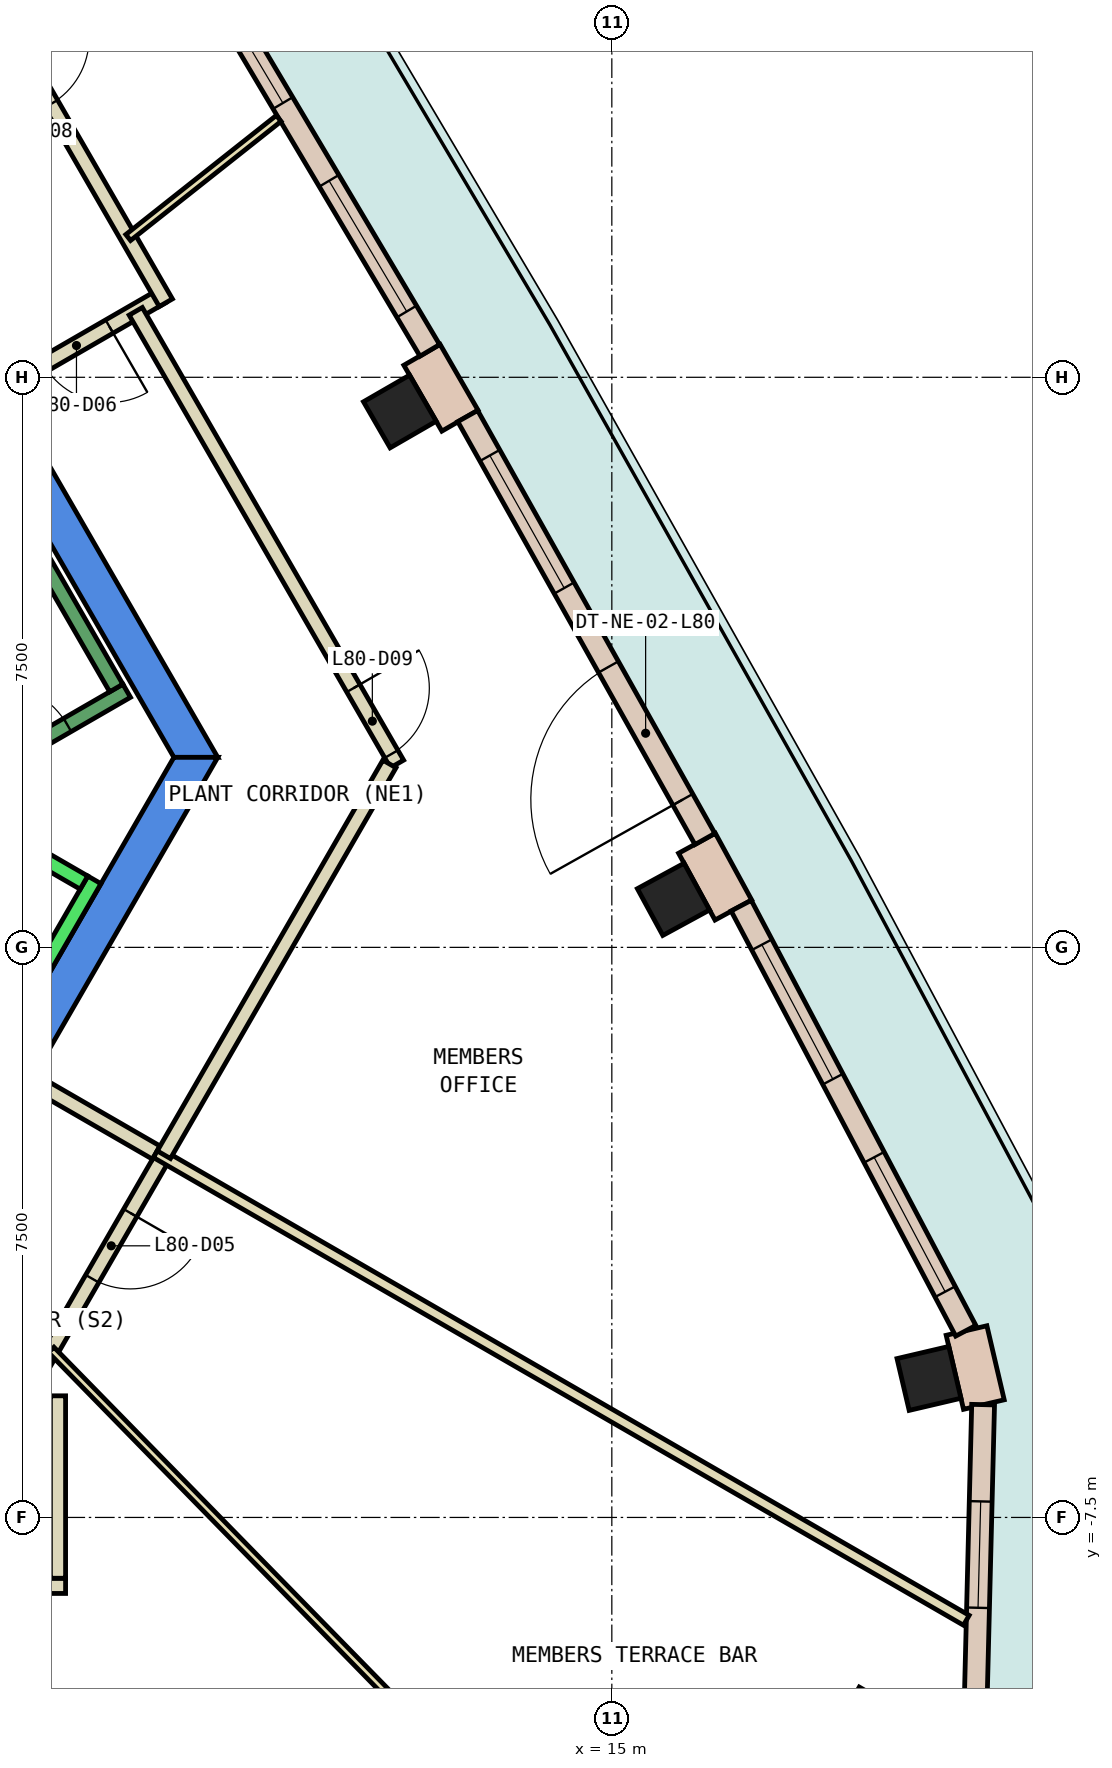
"""IFC4 building model, lengths in metres.
Left out: names, types, materials, properties, quantities, classifications, styles, units other than length and angle.
Written with IfcOpenShell. Run it as: python <this file> out.ifc"""

import sys

from ifc_helpers import new_model, si_unit, direction, frame, frame_2d, origin, origin_2d, place, context, subcontext, project, spatial, polyline, rectangle, outline, extrude, element, fill, save


model = new_model("IFC4")
c1 = context("Model", 3, precision=1e-05, world=origin(), true_north=direction((0.0, 1.0)))
c2 = subcontext(c1, "Body", "Model", "MODEL_VIEW")
j1 = project(units=[si_unit("LENGTHUNIT", "METRE"), si_unit("PLANEANGLEUNIT", "RADIAN")], contexts=[c1])
p1 = place(None, origin())
s1 = spatial("IfcSite", under=j1, at=p1, CompositionType="ELEMENT")
p2 = place(p1, origin())
s2 = spatial("IfcBuilding", under=s1, at=p2, CompositionType="ELEMENT")
p3 = place(p2, frame((0.0, 0.0, 340.4)))
s3 = spatial("IfcBuildingStorey", under=s2, at=p3, CompositionType="ELEMENT", Elevation=340.4)
p4 = place(p3, frame((18.512, -10.688, 0.0), z_axis=(0.0, 0.0, 1.0), x_axis=(-0.866025403784, 0.5, 0.0)))
e1 = element("IfcColumn", 1, at=p4, inside=s3, PredefinedType="COLUMN", context=c2, shape_type="SweptSolid", body=[
    extrude(rectangle(XDim=1.4, YDim=1.4, at=origin_2d()), origin(), (0.0, 0.0, 1.0), 4.15),
])
for number, where, z_axis, x_axis in (
    (2, (19.173, -5.671, 0.0), (0.0, 0.0, 1.0), (-0.228, 0.974, 0.0)),
    (3, (15.811, 0.632, 0.0), (0.0, 0.0, 1.0), (-0.478, 0.878, 0.0)),
    (4, (12.211, 7.05, 0.0), (0.0, 0.0, 1.0), (-0.5, 0.866, 0.0)),
):
    element("IfcColumn", number, at=place(p3, frame(where, z_axis=z_axis, x_axis=x_axis)), inside=s3, PredefinedType="COLUMN", context=c2, shape_type="SweptSolid", body=[
        extrude(rectangle(XDim=0.7, YDim=0.7, at=origin_2d()), origin(), (0.0, 0.0, 1.0), 4.15),
    ])
p5 = place(p3, frame((0.0, 0.0, -0.45)))
e5 = element("IfcWall", 5, at=p5, inside=s3, PredefinedType="SHEAR", context=c2, shape_type="SweptSolid", body=[
    extrude(outline(polyline([(5.486, 9.998), (5.053, 9.748), (9.238, 2.5), (9.815, 2.5), (5.486, 9.998)])), origin(), (0.0, 0.0, 1.0), 4.6),
])
p6 = place(p3, frame((0.0, 0.0, -0.45)))
e6 = element("IfcWall", 6, at=p6, inside=s3, PredefinedType="SHEAR", context=c2, shape_type="SweptSolid", body=[
    extrude(outline(polyline([(4.907, -6.0), (9.815, 2.5), (9.238, 2.5), (4.619, -5.5), (4.907, -6.0)])), origin(), (0.0, 0.0, 1.0), 4.6),
])
p7 = place(p3, frame((19.895, -6.015, 0.0), z_axis=(0.0, 0.0, 1.0), x_axis=(-0.227978015861, 0.97366627973, 0.0)))
e7 = element("IfcWall", 7, at=p7, inside=s3, PredefinedType="STANDARD", context=c2, shape_type="SweptSolid", body=[
    extrude(rectangle(XDim=1.0, YDim=0.55, at=frame_2d((0.5, 0.0))), origin(), (0.0, 0.0, 1.0), 4.15),
])
p8 = place(p3, frame((16.599, 0.491, 0.0), z_axis=(0.0, 0.0, 1.0), x_axis=(-0.478442030542, 0.878119139645, 0.0)))
e8 = element("IfcWall", 8, at=p8, inside=s3, PredefinedType="STANDARD", context=c2, shape_type="SweptSolid", body=[
    extrude(rectangle(XDim=1.001, YDim=0.55, at=frame_2d((0.5, 0.0))), origin(), (0.0, 0.0, 1.0), 4.15),
])
p9 = place(p3, frame((13.002, 6.929, 0.0), z_axis=(0.0, 0.0, 1.0), x_axis=(-0.49960277677, 0.866254619292, 0.0)))
e9 = element("IfcWall", 9, at=p9, inside=s3, PredefinedType="STANDARD", context=c2, shape_type="SweptSolid", body=[
    extrude(rectangle(XDim=1.001, YDim=0.55, at=frame_2d((0.5, 0.0))), origin(), (0.0, 0.0, 1.0), 4.15),
])
p10 = place(p3, frame((19.776, -10.379, 0.0), z_axis=(0.0, 0.0, 1.0), x_axis=(0.025006167975, 0.99968729689, 0.0)))
e10 = element("IfcWall", 10, at=p10, inside=s3, PredefinedType="STANDARD", context=c2, shape_type="SweptSolid", body=[
    extrude(rectangle(XDim=4.364, YDim=0.3, at=frame_2d((2.182, 0.0))), origin(), (0.0, 0.0, 1.0), 4.15),
])
p11 = place(p10, frame((1.691, 0.0, 0.9)))
e11 = element("IfcOpeningElement", 11, at=p11, cuts=e10, PredefinedType="OPENING", context=c2, shape_type="SweptSolid", body=[
    extrude(rectangle(XDim=1.4, YDim=3.0, at=frame_2d((0.7, 1.5))), frame((0.0, 0.16, 0.0), z_axis=(0.0, -1.0, 0.0), x_axis=(1.0, 0.0, 0.0)), (0.0, 0.0, 1.0), 0.32),
])
p12 = place(p3, frame((19.657, -5.044, 0.0), z_axis=(0.0, 0.0, 1.0), x_axis=(-0.467155191513, 0.884175337274, 0.0)))
e12 = element("IfcWall", 12, at=p12, inside=s3, PredefinedType="STANDARD", context=c2, shape_type="SweptSolid", body=[
    extrude(rectangle(XDim=6.326, YDim=0.3, at=frame_2d((3.163, 0.0))), origin(), (0.0, 0.0, 1.0), 4.15),
])
p13 = place(p12, frame((0.581, 0.0, 0.9)))
e13 = element("IfcOpeningElement", 13, at=p13, cuts=e12, PredefinedType="OPENING", context=c2, shape_type="SweptSolid", body=[
    extrude(rectangle(XDim=2.0, YDim=3.0, at=frame_2d((1.0, 1.5))), frame((0.0, 0.16, 0.0), z_axis=(0.0, -1.0, 0.0), x_axis=(1.0, 0.0, 0.0)), (0.0, 0.0, 1.0), 0.32),
])
p14 = place(p12, frame((3.744, 0.0, 0.9)))
e14 = element("IfcOpeningElement", 14, at=p14, cuts=e12, PredefinedType="OPENING", context=c2, shape_type="SweptSolid", body=[
    extrude(rectangle(XDim=2.0, YDim=3.0, at=frame_2d((1.0, 1.5))), frame((0.0, 0.16, 0.0), z_axis=(0.0, -1.0, 0.0), x_axis=(1.0, 0.0, 0.0)), (0.0, 0.0, 1.0), 0.32),
])
p15 = place(p3, frame((16.225, 1.426, 0.0), z_axis=(0.0, 0.0, 1.0), x_axis=(-0.489232514948, 0.872153396094, 0.0)))
e15 = element("IfcWall", 15, at=p15, inside=s3, PredefinedType="STANDARD", context=c2, shape_type="SweptSolid", body=[
    extrude(rectangle(XDim=6.38, YDim=0.3, at=frame_2d((3.19, 0.0))), origin(), (0.0, 0.0, 1.0), 4.15),
])
p16 = place(p15, frame((0.595, 0.0, 0.0)))
e16 = element("IfcOpeningElement", 16, at=p16, cuts=e15, PredefinedType="OPENING", context=c2, shape_type="SweptSolid", body=[
    extrude(rectangle(XDim=2.0, YDim=2.4, at=frame_2d((1.0, 1.2))), frame((0.0, 0.16, 0.0), z_axis=(0.0, -1.0, 0.0), x_axis=(1.0, 0.0, 0.0)), (0.0, 0.0, 1.0), 0.32),
])
p17 = place(p15, frame((3.785, 0.0, 0.9)))
e17 = element("IfcOpeningElement", 17, at=p17, cuts=e15, PredefinedType="OPENING", context=c2, shape_type="SweptSolid", body=[
    extrude(rectangle(XDim=2.0, YDim=3.0, at=frame_2d((1.0, 1.5))), frame((0.0, 0.16, 0.0), z_axis=(0.0, -1.0, 0.0), x_axis=(1.0, 0.0, 0.0)), (0.0, 0.0, 1.0), 0.32),
])
p18 = place(p3, frame((12.605, 7.854, 0.0), z_axis=(0.0, 0.0, 1.0), x_axis=(-0.510686403068, 0.859767060152, 0.0)))
e18 = element("IfcWall", 18, at=p18, inside=s3, PredefinedType="STANDARD", context=c2, shape_type="SweptSolid", body=[
    extrude(rectangle(XDim=6.38, YDim=0.3, at=frame_2d((3.19, 0.0))), origin(), (0.0, 0.0, 1.0), 4.15),
])
p19 = place(p18, frame((0.595, 0.0, 0.9)))
e19 = element("IfcOpeningElement", 19, at=p19, cuts=e18, PredefinedType="OPENING", context=c2, shape_type="SweptSolid", body=[
    extrude(rectangle(XDim=2.0, YDim=3.0, at=frame_2d((1.0, 1.5))), frame((0.0, 0.16, 0.0), z_axis=(0.0, -1.0, 0.0), x_axis=(1.0, 0.0, 0.0)), (0.0, 0.0, 1.0), 0.32),
])
p20 = place(p18, frame((3.785, 0.0, 0.9)))
e20 = element("IfcOpeningElement", 20, at=p20, cuts=e18, PredefinedType="OPENING", context=c2, shape_type="SweptSolid", body=[
    extrude(rectangle(XDim=2.0, YDim=3.0, at=frame_2d((1.0, 1.5))), frame((0.0, 0.16, 0.0), z_axis=(0.0, -1.0, 0.0), x_axis=(1.0, 0.0, 0.0)), (0.0, 0.0, 1.0), 0.32),
])
p21 = place(p3, frame((7.813, -8.4, 0.0), z_axis=(0.0, 0.0, 1.0), x_axis=(-1.0, 0.0, 0.0)))
e21 = element("IfcWall", 21, at=p21, inside=s3, PredefinedType="PARTITIONING", context=c2, shape_type="SweptSolid", body=[
    extrude(rectangle(XDim=5.769, YDim=0.2, at=frame_2d((2.885, 0.0))), origin(), (0.0, 0.0, 1.0), 4.15),
])
p22 = place(p21, frame((2.289, 0.0, 0.0)))
e22 = element("IfcOpeningElement", 22, at=p22, cuts=e21, PredefinedType="OPENING", context=c2, shape_type="SweptSolid", body=[
    extrude(rectangle(XDim=1.0, YDim=2.1, at=frame_2d((0.5, 1.05))), frame((0.0, 0.11, 0.0), z_axis=(0.0, -1.0, 0.0), x_axis=(1.0, 0.0, 0.0)), (0.0, 0.0, 1.0), 0.22),
])
p23 = place(p3, frame((7.713, -5.9, 0.0), z_axis=(0.0, 0.0, 1.0), x_axis=(0.0, -1.0, 0.0)))
e23 = element("IfcWall", 23, at=p23, inside=s3, PredefinedType="PARTITIONING", context=c2, shape_type="SweptSolid", body=[
    extrude(rectangle(XDim=2.4, YDim=0.2, at=frame_2d((1.2, 0.0))), origin(), (0.0, 0.0, 1.0), 4.15),
])
p24 = place(p3, frame((9.106, -2.728, 0.0), z_axis=(0.0, 0.0, 1.0), x_axis=(-0.500132879116, -0.865948672398, 0.0)))
e24 = element("IfcWall", 24, at=p24, inside=s3, PredefinedType="PARTITIONING", context=c2, shape_type="SweptSolid", body=[
    extrude(rectangle(XDim=3.879, YDim=0.2, at=frame_2d((1.939, 0.0))), origin(), (0.0, 0.0, 1.0), 4.15),
])
p25 = place(p24, frame((0.884, 0.0, 0.0)))
e25 = element("IfcOpeningElement", 25, at=p25, cuts=e24, PredefinedType="OPENING", context=c2, shape_type="SweptSolid", body=[
    extrude(rectangle(XDim=1.0, YDim=2.1, at=frame_2d((0.5, 1.05))), frame((0.0, 0.11, 0.0), z_axis=(0.0, -1.0, 0.0), x_axis=(1.0, 0.0, 0.0)), (0.0, 0.0, 1.0), 0.22),
])
p26 = place(p3, frame((7.361, -1.75, 0.0), z_axis=(0.0, 0.0, 1.0), x_axis=(0.865980106173, -0.500078449558, 0.0)))
e26 = element("IfcWall", 26, at=p26, inside=s3, PredefinedType="PARTITIONING", context=c2, shape_type="SweptSolid", body=[
    extrude(rectangle(XDim=1.9, YDim=0.2, at=frame_2d((0.95, 0.0))), origin(), (0.0, 0.0, 1.0), 4.15),
])
p27 = place(p3, frame((7.624, -5.295, 0.0), z_axis=(0.0, 0.0, 1.0), x_axis=(0.699225895869, -0.714900794898, 0.0)))
e27 = element("IfcWall", 27, at=p27, inside=s3, PredefinedType="PARTITIONING", context=c2, shape_type="SweptSolid", body=[
    extrude(rectangle(XDim=11.681, YDim=0.1, at=frame_2d((5.841, 0.0))), origin(), (0.0, 0.0, 1.0), 4.15),
])
p28 = place(p3, frame((19.664, -8.853, 0.0), z_axis=(0.0, 0.0, 1.0), x_axis=(-0.866035935173, 0.499981758657, 0.0)))
e28 = element("IfcWall", 28, at=p28, inside=s3, PredefinedType="PARTITIONING", context=c2, shape_type="SweptSolid", body=[
    extrude(rectangle(XDim=12.307, YDim=0.15, at=frame_2d((6.153, 0.0))), origin(), (0.0, 0.0, 1.0), 4.15),
])
p29 = place(p3, frame((9.082, 8.568, 0.0), z_axis=(0.0, 0.0, 1.0), x_axis=(-0.865955154139, -0.50012165622, 0.0)))
e29 = element("IfcWall", 29, at=p29, inside=s3, PredefinedType="PARTITIONING", context=c2, shape_type="SweptSolid", body=[
    extrude(rectangle(XDim=2.4, YDim=0.2, at=frame_2d((1.2, 0.0))), origin(), (0.0, 0.0, 1.0), 4.15),
])
p30 = place(p29, frame((0.8, 0.0, 0.0)))
e30 = element("IfcOpeningElement", 30, at=p30, cuts=e29, PredefinedType="OPENING", context=c2, shape_type="SweptSolid", body=[
    extrude(rectangle(XDim=1.0, YDim=2.1, at=frame_2d((0.5, 1.05))), frame((0.0, 0.11, 0.0), z_axis=(0.0, -1.0, 0.0), x_axis=(1.0, 0.0, 0.0)), (0.0, 0.0, 1.0), 0.22),
])
p31 = place(p3, frame((5.532, 14.717, 0.0), z_axis=(0.0, 0.0, 1.0), x_axis=(0.499968011863, -0.866043871356, 0.0)))
e31 = element("IfcWall", 31, at=p31, inside=s3, PredefinedType="PARTITIONING", context=c2, shape_type="SweptSolid", body=[
    extrude(rectangle(XDim=7.201, YDim=0.2, at=frame_2d((3.6, 0.0))), origin(), (0.0, 0.0, 1.0), 4.15),
])
p32 = place(p31, frame((3.18, 0.0, 0.0)))
e32 = element("IfcOpeningElement", 32, at=p32, cuts=e31, PredefinedType="OPENING", context=c2, shape_type="SweptSolid", body=[
    extrude(rectangle(XDim=1.0, YDim=2.1, at=frame_2d((0.5, 1.05))), frame((0.0, 0.11, 0.0), z_axis=(0.0, -1.0, 0.0), x_axis=(1.0, 0.0, 0.0)), (0.0, 0.0, 1.0), 0.22),
])
p33 = place(p3, frame((8.736, 8.368, 0.0), z_axis=(0.0, 0.0, 1.0), x_axis=(0.499995994493, -0.866027716353, 0.0)))
e33 = element("IfcWall", 33, at=p33, inside=s3, PredefinedType="PARTITIONING", context=c2, shape_type="SweptSolid", body=[
    extrude(rectangle(XDim=6.876, YDim=0.2, at=frame_2d((3.438, 0.0))), origin(), (0.0, 0.0, 1.0), 4.15),
])
p34 = place(p33, frame((5.726, 0.0, 0.0)))
e34 = element("IfcOpeningElement", 34, at=p34, cuts=e33, PredefinedType="OPENING", context=c2, shape_type="SweptSolid", body=[
    extrude(rectangle(XDim=1.0, YDim=2.1, at=frame_2d((0.5, 1.05))), frame((0.0, 0.11, 0.0), z_axis=(0.0, -1.0, 0.0), x_axis=(1.0, 0.0, 0.0)), (0.0, 0.0, 1.0), 0.22),
])
p35 = place(p3, frame((12.074, 2.413, 0.0), z_axis=(0.0, 0.0, 1.0), x_axis=(-0.499974029402, -0.866040397397, 0.0)))
e35 = element("IfcWall", 35, at=p35, inside=s3, PredefinedType="PARTITIONING", context=c2, shape_type="SweptSolid", body=[
    extrude(rectangle(XDim=5.936, YDim=0.2, at=frame_2d((2.968, 0.0))), origin(), (0.0, 0.0, 1.0), 4.15),
])
p36 = place(p3, frame((10.617, 10.906, 0.0), z_axis=(0.0, 0.0, 1.0), x_axis=(-0.784159528351, -0.620559291363, 0.0)))
e36 = element("IfcWall", 36, at=p36, inside=s3, PredefinedType="PARTITIONING", context=c2, shape_type="SweptSolid", body=[
    extrude(rectangle(XDim=2.525, YDim=0.1, at=frame_2d((1.262, 0.0))), origin(), (0.0, 0.0, 1.0), 4.15),
])
p37 = place(p3, frame((5.492, -3.788, 0.0), z_axis=(0.0, 0.0, 1.0), x_axis=(0.500034260056, 0.866005622828, 0.0)))
e37 = element("IfcWall", 37, at=p37, inside=s3, PredefinedType="STANDARD", context=c2, shape_type="SweptSolid", body=[
    extrude(rectangle(XDim=5.399, YDim=0.2, at=frame_2d((2.7, 0.0))), origin(), (0.0, 0.0, 1.0), 4.15),
])
p38 = place(p3, frame((5.977, 2.052, 0.0), z_axis=(0.0, 0.0, 1.0), x_axis=(0.865973769406, -0.500089422704, 0.0)))
e38 = element("IfcWall", 38, at=p38, inside=s3, PredefinedType="STANDARD", context=c2, shape_type="SweptSolid", body=[
    extrude(rectangle(XDim=2.399, YDim=0.2, at=frame_2d((1.2, 0.0))), origin(), (0.0, 0.0, 1.0), 4.15),
])
p39 = place(p3, frame((4.806, 1.176, 0.0), z_axis=(0.0, 0.0, 1.0), x_axis=(0.866059941101, 0.499940174841, 0.0)))
e39 = element("IfcWall", 39, at=p39, inside=s3, PredefinedType="STANDARD", context=c2, shape_type="SweptSolid", body=[
    extrude(rectangle(XDim=4.4, YDim=0.2, at=frame_2d((2.2, 0.0))), origin(), (0.0, 0.0, 1.0), 4.15),
])
p40 = place(p39, frame((2.4, 0.0, 0.0)))
e40 = element("IfcOpeningElement", 40, at=p40, cuts=e39, PredefinedType="OPENING", context=c2, shape_type="SweptSolid", body=[
    extrude(rectangle(XDim=1.1, YDim=2.2, at=frame_2d((0.55, 1.1))), frame((0.0, 0.11, 0.0), z_axis=(0.0, -1.0, 0.0), x_axis=(1.0, 0.0, 0.0)), (0.0, 0.0, 1.0), 0.22),
])
p41 = place(p3, frame((8.48, 3.412, 0.0), z_axis=(0.0, 0.0, 1.0), x_axis=(-0.499978703459, 0.866037698999, 0.0)))
e41 = element("IfcWall", 41, at=p41, inside=s3, PredefinedType="STANDARD", context=c2, shape_type="SweptSolid", body=[
    extrude(rectangle(XDim=6.9, YDim=0.2, at=frame_2d((3.45, 0.0))), origin(), (0.0, 0.0, 1.0), 4.15),
])
p42 = place(p11, origin())
e42 = element("IfcWindow", 42, at=p42, inside=s3, PartitioningType="SINGLE_PANEL", PredefinedType="WINDOW", context=c2, shape_type="SweptSolid", body=[
    extrude(rectangle(XDim=1.4, YDim=3.0, at=frame_2d((0.7, 1.5))), frame((0.0, 0.03, 0.0), z_axis=(0.0, -1.0, 0.0), x_axis=(1.0, 0.0, 0.0)), (0.0, 0.0, 1.0), 0.06),
])
fill(e11, e42)
p43 = place(p13, origin())
e43 = element("IfcWindow", 43, at=p43, inside=s3, PartitioningType="SINGLE_PANEL", PredefinedType="WINDOW", context=c2, shape_type="SweptSolid", body=[
    extrude(rectangle(XDim=2.0, YDim=3.0, at=frame_2d((1.0, 1.5))), frame((0.0, 0.03, 0.0), z_axis=(0.0, -1.0, 0.0), x_axis=(1.0, 0.0, 0.0)), (0.0, 0.0, 1.0), 0.06),
])
fill(e13, e43)
p44 = place(p14, origin())
e44 = element("IfcWindow", 44, at=p44, inside=s3, PartitioningType="SINGLE_PANEL", PredefinedType="WINDOW", context=c2, shape_type="SweptSolid", body=[
    extrude(rectangle(XDim=2.0, YDim=3.0, at=frame_2d((1.0, 1.5))), frame((0.0, 0.03, 0.0), z_axis=(0.0, -1.0, 0.0), x_axis=(1.0, 0.0, 0.0)), (0.0, 0.0, 1.0), 0.06),
])
fill(e14, e44)
p45 = place(p16, origin())
e45 = element("IfcDoor", 45, at=p45, inside=s3, OperationType="SLIDING_TO_LEFT", PredefinedType="DOOR", context=c2, shape_type="SweptSolid", body=[
    extrude(rectangle(XDim=2.0, YDim=2.4, at=frame_2d((1.0, 1.2))), frame((0.0, 0.025, 0.0), z_axis=(0.0, -1.0, 0.0), x_axis=(1.0, 0.0, 0.0)), (0.0, 0.0, 1.0), 0.05),
])
fill(e16, e45)
p46 = place(p17, origin())
e46 = element("IfcWindow", 46, at=p46, inside=s3, PartitioningType="SINGLE_PANEL", PredefinedType="WINDOW", context=c2, shape_type="SweptSolid", body=[
    extrude(rectangle(XDim=2.0, YDim=3.0, at=frame_2d((1.0, 1.5))), frame((0.0, 0.03, 0.0), z_axis=(0.0, -1.0, 0.0), x_axis=(1.0, 0.0, 0.0)), (0.0, 0.0, 1.0), 0.06),
])
fill(e17, e46)
p47 = place(p19, origin())
e47 = element("IfcWindow", 47, at=p47, inside=s3, PartitioningType="SINGLE_PANEL", PredefinedType="WINDOW", context=c2, shape_type="SweptSolid", body=[
    extrude(rectangle(XDim=2.0, YDim=3.0, at=frame_2d((1.0, 1.5))), frame((0.0, 0.03, 0.0), z_axis=(0.0, -1.0, 0.0), x_axis=(1.0, 0.0, 0.0)), (0.0, 0.0, 1.0), 0.06),
])
fill(e19, e47)
p48 = place(p20, origin())
e48 = element("IfcWindow", 48, at=p48, inside=s3, PartitioningType="SINGLE_PANEL", PredefinedType="WINDOW", context=c2, shape_type="SweptSolid", body=[
    extrude(rectangle(XDim=2.0, YDim=3.0, at=frame_2d((1.0, 1.5))), frame((0.0, 0.03, 0.0), z_axis=(0.0, -1.0, 0.0), x_axis=(1.0, 0.0, 0.0)), (0.0, 0.0, 1.0), 0.06),
])
fill(e20, e48)
p49 = place(p25, origin())
e49 = element("IfcDoor", 49, at=p49, inside=s3, OperationType="SINGLE_SWING_LEFT", PredefinedType="DOOR", context=c2, shape_type="SweptSolid", body=[
    extrude(rectangle(XDim=1.0, YDim=2.1, at=frame_2d((0.5, 1.05))), frame((0.0, 0.025, 0.0), z_axis=(0.0, -1.0, 0.0), x_axis=(1.0, 0.0, 0.0)), (0.0, 0.0, 1.0), 0.05),
])
fill(e25, e49)
p50 = place(p30, origin())
e50 = element("IfcDoor", 50, at=p50, inside=s3, OperationType="SINGLE_SWING_LEFT", PredefinedType="DOOR", context=c2, shape_type="SweptSolid", body=[
    extrude(rectangle(XDim=1.0, YDim=2.1, at=frame_2d((0.5, 1.05))), frame((0.0, 0.025, 0.0), z_axis=(0.0, -1.0, 0.0), x_axis=(1.0, 0.0, 0.0)), (0.0, 0.0, 1.0), 0.05),
])
fill(e30, e50)
p51 = place(p32, origin())
e51 = element("IfcDoor", 51, at=p51, inside=s3, OperationType="SINGLE_SWING_LEFT", PredefinedType="DOOR", context=c2, shape_type="SweptSolid", body=[
    extrude(rectangle(XDim=1.0, YDim=2.1, at=frame_2d((0.5, 1.05))), frame((0.0, 0.025, 0.0), z_axis=(0.0, -1.0, 0.0), x_axis=(1.0, 0.0, 0.0)), (0.0, 0.0, 1.0), 0.05),
])
fill(e32, e51)
p52 = place(p34, origin())
e52 = element("IfcDoor", 52, at=p52, inside=s3, OperationType="SINGLE_SWING_RIGHT", PredefinedType="DOOR", context=c2, shape_type="SweptSolid", body=[
    extrude(rectangle(XDim=1.0, YDim=2.1, at=frame_2d((0.5, 1.05))), frame((0.0, 0.025, 0.0), z_axis=(0.0, -1.0, 0.0), x_axis=(1.0, 0.0, 0.0)), (0.0, 0.0, 1.0), 0.05),
])
fill(e34, e52)
p53 = place(p40, origin())
e53 = element("IfcDoor", 53, at=p53, inside=s3, OperationType="SINGLE_SWING_LEFT", PredefinedType="DOOR", context=c2, shape_type="SweptSolid", body=[
    extrude(rectangle(XDim=1.1, YDim=2.2, at=frame_2d((0.55, 1.1))), frame((0.0, 0.025, 0.0), z_axis=(0.0, -1.0, 0.0), x_axis=(1.0, 0.0, 0.0)), (0.0, 0.0, 1.0), 0.05),
])
fill(e40, e53)
save(model, sys.argv[1])
